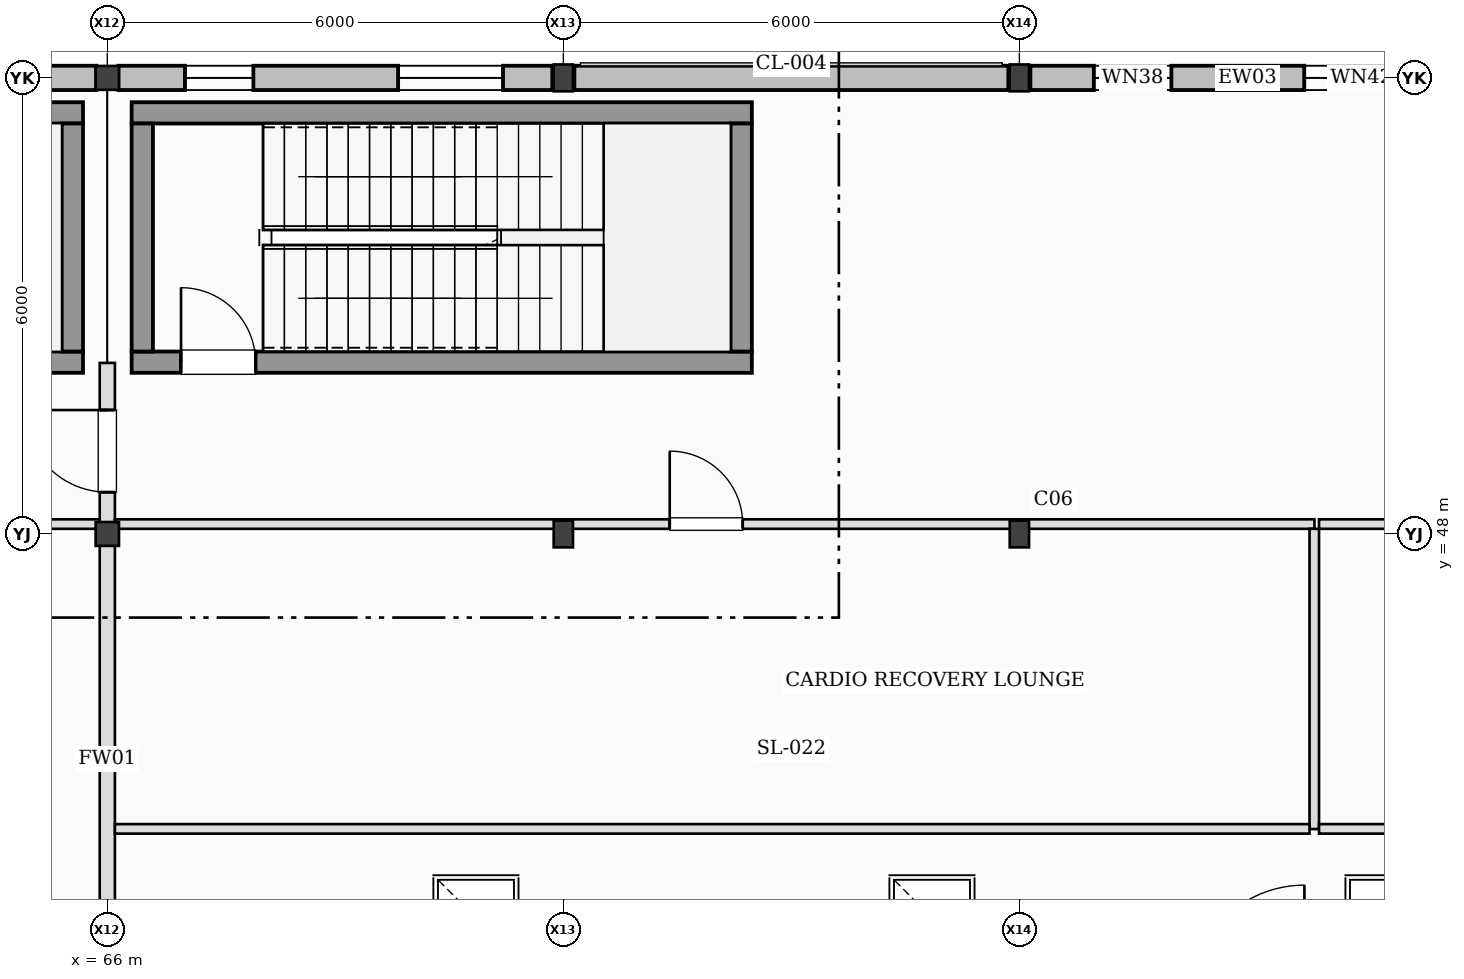
"""IFC4 building model, lengths in metres.
Left out: names, types, materials, properties, quantities, classifications, styles, units other than length and angle.
Written with IfcOpenShell. Run it as: python <this file> out.ifc"""

import sys

from ifc_helpers import new_model, si_unit, direction, frame, frame_2d, origin, origin_2d, place, context, subcontext, project, spatial, rectangle, i_section, extrude, element, fill, save


model = new_model("IFC4")
c1 = context("Model", 3, precision=1e-05, world=origin(), true_north=direction((0.0, 1.0)))
c2 = subcontext(c1, "Body", "Model", "MODEL_VIEW")
j1 = project(units=[si_unit("LENGTHUNIT", "METRE"), si_unit("PLANEANGLEUNIT", "RADIAN")], contexts=[c1])
p1 = place(None, origin())
s1 = spatial("IfcSite", under=j1, at=p1, CompositionType="ELEMENT")
p2 = place(p1, origin())
s2 = spatial("IfcBuilding", under=s1, at=p2, CompositionType="ELEMENT")
p3 = place(p2, frame((0.0, 0.0, 6.0)))
s3 = spatial("IfcBuildingStorey", under=s2, at=p3, CompositionType="ELEMENT", Elevation=6.0)
for number, where, z_axis, x_axis in (
    (1, (66.0, 48.0, 0.0), (0.0, 0.0, 1.0), (1.0, 0.0, 0.0)),
    (2, (66.0, 54.0, 0.0), (0.0, 0.0, 1.0), (1.0, 0.0, 0.0)),
):
    element("IfcColumn", number, at=place(p3, frame(where, z_axis=z_axis, x_axis=x_axis)), inside=s3, PredefinedType="COLUMN", context=c2, shape_type="SweptSolid", body=[
        extrude(i_section(OverallWidth=0.307, OverallDepth=0.314, WebThickness=0.011, FlangeThickness=0.019, at=origin_2d()), origin(), (0.0, 0.0, 1.0), 4.0),
    ])
for number, where, z_axis, x_axis in (
    (3, (72.0, 48.0, 0.0), (0.0, 0.0, 1.0), (1.0, 0.0, 0.0)),
    (4, (72.0, 54.0, 0.0), (0.0, 0.0, 1.0), (1.0, 0.0, 0.0)),
    (5, (78.0, 48.0, 0.0), (0.0, 0.0, 1.0), (1.0, 0.0, 0.0)),
    (6, (78.0, 54.0, 0.0), (0.0, 0.0, 1.0), (1.0, 0.0, 0.0)),
):
    element("IfcColumn", number, at=place(p3, frame(where, z_axis=z_axis, x_axis=x_axis)), inside=s3, PredefinedType="COLUMN", context=c2, shape_type="SweptSolid", body=[
        extrude(i_section(OverallWidth=0.254, OverallDepth=0.353, WebThickness=0.01, FlangeThickness=0.016, at=origin_2d()), origin(), (0.0, 0.0, 1.0), 4.0),
    ])
p4 = place(p3, frame((65.855, 54.0, 0.0), z_axis=(0.0, 0.0, 1.0), x_axis=(-1.0, 0.0, 0.0)))
e7 = element("IfcWall", 7, at=p4, inside=s3, PredefinedType="STANDARD", context=c2, shape_type="SweptSolid", body=[
    extrude(rectangle(XDim=5.71, YDim=0.32, at=frame_2d((2.855, 0.0))), origin(), (0.0, 0.0, 1.0), 4.0),
])
p5 = place(p4, frame((0.67, 0.0, 1.18)))
e8 = element("IfcOpeningElement", 8, at=p5, cuts=e7, PredefinedType="OPENING", context=c2, shape_type="SweptSolid", body=[
    extrude(rectangle(XDim=1.32, YDim=1.32, at=frame_2d((0.66, 0.66))), frame((0.0, 0.17, 0.0), z_axis=(0.0, -1.0, 0.0), x_axis=(1.0, 0.0, 0.0)), (0.0, 0.0, 1.0), 0.34),
])
p6 = place(p4, frame((3.504, 0.0, 0.96)))
e9 = element("IfcOpeningElement", 9, at=p6, cuts=e7, PredefinedType="OPENING", context=c2, shape_type="SweptSolid", body=[
    extrude(rectangle(XDim=1.56, YDim=1.56, at=frame_2d((0.78, 0.78))), frame((0.0, 0.17, 0.0), z_axis=(0.0, -1.0, 0.0), x_axis=(1.0, 0.0, 0.0)), (0.0, 0.0, 1.0), 0.34),
])
p7 = place(p3, frame((71.855, 54.0, 0.0), z_axis=(0.0, 0.0, 1.0), x_axis=(-1.0, 0.0, 0.0)))
e10 = element("IfcWall", 10, at=p7, inside=s3, PredefinedType="STANDARD", context=c2, shape_type="SweptSolid", body=[
    extrude(rectangle(XDim=5.71, YDim=0.32, at=frame_2d((2.855, 0.0))), origin(), (0.0, 0.0, 1.0), 3.153),
])
p8 = place(p7, frame((0.649, 0.0, 0.96)))
e11 = element("IfcOpeningElement", 11, at=p8, cuts=e10, PredefinedType="OPENING", context=c2, shape_type="SweptSolid", body=[
    extrude(rectangle(XDim=1.38, YDim=1.38, at=frame_2d((0.69, 0.69))), frame((0.0, 0.17, 0.0), z_axis=(0.0, -1.0, 0.0), x_axis=(1.0, 0.0, 0.0)), (0.0, 0.0, 1.0), 0.34),
])
p9 = place(p7, frame((3.933, 0.0, 0.86)))
e12 = element("IfcOpeningElement", 12, at=p9, cuts=e10, PredefinedType="OPENING", context=c2, shape_type="SweptSolid", body=[
    extrude(rectangle(XDim=0.9, YDim=0.9, at=frame_2d((0.45, 0.45))), frame((0.0, 0.17, 0.0), z_axis=(0.0, -1.0, 0.0), x_axis=(1.0, 0.0, 0.0)), (0.0, 0.0, 1.0), 0.34),
])
p10 = place(p3, frame((77.855, 54.0, 0.0), z_axis=(0.0, 0.0, 1.0), x_axis=(-1.0, 0.0, 0.0)))
e13 = element("IfcWall", 13, at=p10, inside=s3, PredefinedType="STANDARD", context=c2, shape_type="SweptSolid", body=[
    extrude(rectangle(XDim=5.71, YDim=0.32, at=frame_2d((2.855, 0.0))), origin(), (0.0, 0.0, 1.0), 3.153),
])
p11 = place(p3, frame((83.855, 54.0, 0.0), z_axis=(0.0, 0.0, 1.0), x_axis=(-1.0, 0.0, 0.0)))
e14 = element("IfcWall", 14, at=p11, inside=s3, PredefinedType="STANDARD", context=c2, shape_type="SweptSolid", body=[
    extrude(rectangle(XDim=5.71, YDim=0.32, at=frame_2d((2.855, 0.0))), origin(), (0.0, 0.0, 1.0), 3.153),
])
p12 = place(p11, frame((0.607, 0.0, 0.86)))
e15 = element("IfcOpeningElement", 15, at=p12, cuts=e14, PredefinedType="OPENING", context=c2, shape_type="SweptSolid", body=[
    extrude(rectangle(XDim=1.5, YDim=1.5, at=frame_2d((0.75, 0.75))), frame((0.0, 0.17, 0.0), z_axis=(0.0, -1.0, 0.0), x_axis=(1.0, 0.0, 0.0)), (0.0, 0.0, 1.0), 0.34),
])
p13 = place(p11, frame((3.855, 0.0, 1.42)))
e16 = element("IfcOpeningElement", 16, at=p13, cuts=e14, PredefinedType="OPENING", context=c2, shape_type="SweptSolid", body=[
    extrude(rectangle(XDim=1.02, YDim=1.02, at=frame_2d((0.51, 0.51))), frame((0.0, 0.17, 0.0), z_axis=(0.0, -1.0, 0.0), x_axis=(1.0, 0.0, 0.0)), (0.0, 0.0, 1.0), 0.34),
])
p14 = place(p3, frame((57.52, 50.26, 0.0), z_axis=(0.0, 0.0, 1.0), x_axis=(1.0, 0.0, 0.0)))
e17 = element("IfcWall", 17, at=p14, inside=s3, PredefinedType="SHEAR", context=c2, shape_type="SweptSolid", body=[
    extrude(rectangle(XDim=8.16, YDim=0.28, at=frame_2d((4.08, 0.0))), origin(), (0.0, 0.0, 1.0), 3.75),
])
p15 = place(p14, frame((0.65, 0.0, 0.0)))
e18 = element("IfcOpeningElement", 18, at=p15, cuts=e17, PredefinedType="OPENING", context=c2, shape_type="SweptSolid", body=[
    extrude(rectangle(XDim=0.98, YDim=2.15, at=frame_2d((0.49, 1.075))), frame((0.0, 0.15, 0.0), z_axis=(0.0, -1.0, 0.0), x_axis=(1.0, 0.0, 0.0)), (0.0, 0.0, 1.0), 0.3),
])
p16 = place(p3, frame((65.68, 53.54, 0.0), z_axis=(0.0, 0.0, 1.0), x_axis=(-1.0, 0.0, 0.0)))
e19 = element("IfcWall", 19, at=p16, inside=s3, PredefinedType="SHEAR", context=c2, shape_type="SweptSolid", body=[
    extrude(rectangle(XDim=8.16, YDim=0.28, at=frame_2d((4.08, 0.0))), origin(), (0.0, 0.0, 1.0), 3.75),
])
p17 = place(p3, frame((65.54, 50.4, 0.0), z_axis=(0.0, 0.0, 1.0), x_axis=(0.0, 1.0, 0.0)))
e20 = element("IfcWall", 20, at=p17, inside=s3, PredefinedType="SHEAR", context=c2, shape_type="SweptSolid", body=[
    extrude(rectangle(XDim=3.0, YDim=0.28, at=frame_2d((1.5, 0.0))), origin(), (0.0, 0.0, 1.0), 3.75),
])
p18 = place(p3, frame((66.32, 50.26, 0.0), z_axis=(0.0, 0.0, 1.0), x_axis=(1.0, 0.0, 0.0)))
e21 = element("IfcWall", 21, at=p18, inside=s3, PredefinedType="SHEAR", context=c2, shape_type="SweptSolid", body=[
    extrude(rectangle(XDim=8.16, YDim=0.28, at=frame_2d((4.08, 0.0))), origin(), (0.0, 0.0, 1.0), 4.0),
])
p19 = place(p18, frame((0.65, 0.0, 0.0)))
e22 = element("IfcOpeningElement", 22, at=p19, cuts=e21, PredefinedType="OPENING", context=c2, shape_type="SweptSolid", body=[
    extrude(rectangle(XDim=0.98, YDim=2.15, at=frame_2d((0.49, 1.075))), frame((0.0, 0.15, 0.0), z_axis=(0.0, -1.0, 0.0), x_axis=(1.0, 0.0, 0.0)), (0.0, 0.0, 1.0), 0.3),
])
p20 = place(p3, frame((74.48, 53.54, 0.0), z_axis=(0.0, 0.0, 1.0), x_axis=(-1.0, 0.0, 0.0)))
e23 = element("IfcWall", 23, at=p20, inside=s3, PredefinedType="SHEAR", context=c2, shape_type="SweptSolid", body=[
    extrude(rectangle(XDim=8.16, YDim=0.28, at=frame_2d((4.08, 0.0))), origin(), (0.0, 0.0, 1.0), 4.0),
])
for number, where, z_axis, x_axis in (
    (24, (66.46, 53.4, 0.0), (0.0, 0.0, 1.0), (0.0, -1.0, 0.0)),
    (25, (74.34, 50.4, 0.0), (0.0, 0.0, 1.0), (0.0, 1.0, 0.0)),
):
    element("IfcWall", number, at=place(p3, frame(where, z_axis=z_axis, x_axis=x_axis)), inside=s3, PredefinedType="SHEAR", context=c2, shape_type="SweptSolid", body=[
        extrude(rectangle(XDim=3.0, YDim=0.28, at=frame_2d((1.5, 0.0))), origin(), (0.0, 0.0, 1.0), 4.0),
    ])
p21 = place(p3, frame((66.0, 42.18, 0.0), z_axis=(0.0, 0.0, 1.0), x_axis=(0.0, 1.0, 0.0)))
e26 = element("IfcWall", 26, at=p21, inside=s3, PredefinedType="PARTITIONING", context=c2, shape_type="SweptSolid", body=[
    extrude(rectangle(XDim=5.72, YDim=0.2, at=frame_2d((2.86, 0.0))), origin(), (0.0, 0.0, 1.0), 3.65),
])
p22 = place(p3, frame((66.0, 48.05, 0.0), z_axis=(0.0, 0.0, 1.0), x_axis=(0.0, 1.0, 0.0)))
e27 = element("IfcWall", 27, at=p22, inside=s3, PredefinedType="PARTITIONING", context=c2, shape_type="SweptSolid", body=[
    extrude(rectangle(XDim=2.2, YDim=0.2, at=frame_2d((1.1, 0.0))), origin(), (0.0, 0.0, 1.0), 3.65),
])
p23 = place(p22, frame((0.5, 0.0, 0.0)))
e28 = element("IfcOpeningElement", 28, at=p23, cuts=e27, PredefinedType="OPENING", context=c2, shape_type="SweptSolid", body=[
    extrude(rectangle(XDim=1.08, YDim=2.14, at=frame_2d((0.54, 1.07))), frame((0.0, 0.11, 0.0), z_axis=(0.0, -1.0, 0.0), x_axis=(1.0, 0.0, 0.0)), (0.0, 0.0, 1.0), 0.22),
])
p24 = place(p3, frame((53.98, 48.13, 0.0), z_axis=(0.0, 0.0, 1.0), x_axis=(1.0, 0.0, 0.0)))
e29 = element("IfcWall", 29, at=p24, inside=s3, PredefinedType="PARTITIONING", context=c2, shape_type="SweptSolid", body=[
    extrude(rectangle(XDim=11.92, YDim=0.125, at=frame_2d((5.96, 0.0))), origin(), (0.0, 0.0, 1.0), 3.72),
])
p25 = place(p24, frame((3.936, 0.0, 0.0)))
e30 = element("IfcOpeningElement", 30, at=p25, cuts=e29, PredefinedType="OPENING", context=c2, shape_type="SweptSolid", body=[
    extrude(rectangle(XDim=1.16, YDim=2.2, at=frame_2d((0.58, 1.1))), frame((0.0, 0.073, 0.0), z_axis=(0.0, -1.0, 0.0), x_axis=(1.0, 0.0, 0.0)), (0.0, 0.0, 1.0), 0.145),
])
p26 = place(p3, frame((66.1, 48.13, 0.0), z_axis=(0.0, 0.0, 1.0), x_axis=(1.0, 0.0, 0.0)))
e31 = element("IfcWall", 31, at=p26, inside=s3, PredefinedType="PARTITIONING", context=c2, shape_type="SweptSolid", body=[
    extrude(rectangle(XDim=15.782, YDim=0.125, at=frame_2d((7.891, 0.0))), origin(), (0.0, 0.0, 1.0), 3.153),
])
p27 = place(p26, frame((7.3, 0.0, 0.0)))
e32 = element("IfcOpeningElement", 32, at=p27, cuts=e31, PredefinedType="OPENING", context=c2, shape_type="SweptSolid", body=[
    extrude(rectangle(XDim=0.96, YDim=2.15, at=frame_2d((0.48, 1.075))), frame((0.0, 0.073, 0.0), z_axis=(0.0, -1.0, 0.0), x_axis=(1.0, 0.0, 0.0)), (0.0, 0.0, 1.0), 0.145),
])
p28 = place(p3, frame((81.88, 48.067, 0.0), z_axis=(0.0, 0.0, 1.0), x_axis=(0.0, -1.0, 0.0)))
e33 = element("IfcWall", 33, at=p28, inside=s3, PredefinedType="PARTITIONING", context=c2, shape_type="SweptSolid", body=[
    extrude(rectangle(XDim=3.95, YDim=0.125, at=frame_2d((1.975, 0.0))), origin(), (0.0, 0.0, 1.0), 3.43),
])
p29 = place(p3, frame((81.817, 44.12, 0.0), z_axis=(0.0, 0.0, 1.0), x_axis=(-1.0, 0.0, 0.0)))
e34 = element("IfcWall", 34, at=p29, inside=s3, PredefinedType="PARTITIONING", context=c2, shape_type="SweptSolid", body=[
    extrude(rectangle(XDim=15.717, YDim=0.125, at=frame_2d((7.859, 0.0))), origin(), (0.0, 0.0, 1.0), 3.72),
])
p30 = place(p3, frame((81.942, 48.13, 0.0), z_axis=(0.0, 0.0, 1.0), x_axis=(1.0, 0.0, 0.0)))
e35 = element("IfcWall", 35, at=p30, inside=s3, PredefinedType="PARTITIONING", context=c2, shape_type="SweptSolid", body=[
    extrude(rectangle(XDim=14.22, YDim=0.125, at=frame_2d((7.11, 0.0))), origin(), (0.0, 0.0, 1.0), 3.153),
])
p31 = place(p30, frame((6.198, 0.0, 0.0)))
e36 = element("IfcOpeningElement", 36, at=p31, cuts=e35, PredefinedType="OPENING", context=c2, shape_type="SweptSolid", body=[
    extrude(rectangle(XDim=0.93, YDim=2.1, at=frame_2d((0.465, 1.05))), frame((0.0, 0.073, 0.0), z_axis=(0.0, -1.0, 0.0), x_axis=(1.0, 0.0, 0.0)), (0.0, 0.0, 1.0), 0.145),
])
p32 = place(p3, frame((96.097, 44.12, 0.0), z_axis=(0.0, 0.0, 1.0), x_axis=(-1.0, 0.0, 0.0)))
e37 = element("IfcWall", 37, at=p32, inside=s3, PredefinedType="PARTITIONING", context=c2, shape_type="SweptSolid", body=[
    extrude(rectangle(XDim=14.155, YDim=0.125, at=frame_2d((7.078, 0.0))), origin(), (0.0, 0.0, 1.0), 3.72),
])
p33 = place(p8, origin())
e38 = element("IfcWindow", 38, at=p33, inside=s3, PartitioningType="SINGLE_PANEL", PredefinedType="WINDOW", context=c2, shape_type="SweptSolid", body=[
    extrude(rectangle(XDim=1.38, YDim=1.38, at=frame_2d((0.69, 0.69))), frame((0.0, 0.03, 0.0), z_axis=(0.0, -1.0, 0.0), x_axis=(1.0, 0.0, 0.0)), (0.0, 0.0, 1.0), 0.06),
])
fill(e11, e38)
p34 = place(p9, origin())
e39 = element("IfcWindow", 39, at=p34, inside=s3, PartitioningType="SINGLE_PANEL", PredefinedType="WINDOW", context=c2, shape_type="SweptSolid", body=[
    extrude(rectangle(XDim=0.9, YDim=0.9, at=frame_2d((0.45, 0.45))), frame((0.0, 0.03, 0.0), z_axis=(0.0, -1.0, 0.0), x_axis=(1.0, 0.0, 0.0)), (0.0, 0.0, 1.0), 0.06),
])
fill(e12, e39)
p35 = place(p12, origin())
e40 = element("IfcWindow", 40, at=p35, inside=s3, PartitioningType="SINGLE_PANEL", PredefinedType="WINDOW", context=c2, shape_type="SweptSolid", body=[
    extrude(rectangle(XDim=1.5, YDim=1.5, at=frame_2d((0.75, 0.75))), frame((0.0, 0.03, 0.0), z_axis=(0.0, -1.0, 0.0), x_axis=(1.0, 0.0, 0.0)), (0.0, 0.0, 1.0), 0.06),
])
fill(e15, e40)
p36 = place(p13, origin())
e41 = element("IfcWindow", 41, at=p36, inside=s3, PartitioningType="SINGLE_PANEL", PredefinedType="WINDOW", context=c2, shape_type="SweptSolid", body=[
    extrude(rectangle(XDim=1.02, YDim=1.02, at=frame_2d((0.51, 0.51))), frame((0.0, 0.03, 0.0), z_axis=(0.0, -1.0, 0.0), x_axis=(1.0, 0.0, 0.0)), (0.0, 0.0, 1.0), 0.06),
])
fill(e16, e41)
p37 = place(p19, origin())
e42 = element("IfcDoor", 42, at=p37, inside=s3, OperationType="SINGLE_SWING_LEFT", PredefinedType="DOOR", context=c2, shape_type="SweptSolid", body=[
    extrude(rectangle(XDim=0.98, YDim=2.15, at=frame_2d((0.49, 1.075))), frame((0.0, 0.025, 0.0), z_axis=(0.0, -1.0, 0.0), x_axis=(1.0, 0.0, 0.0)), (0.0, 0.0, 1.0), 0.05),
])
fill(e22, e42)
p38 = place(p23, frame((1.08, 0.0, 0.0), z_axis=(0.0, 0.0, 1.0), x_axis=(-1.0, 0.0, 0.0)))
e43 = element("IfcDoor", 43, at=p38, inside=s3, OperationType="SINGLE_SWING_RIGHT", PredefinedType="DOOR", context=c2, shape_type="SweptSolid", body=[
    extrude(rectangle(XDim=1.08, YDim=2.14, at=frame_2d((0.54, 1.07))), frame((0.0, 0.025, 0.0), z_axis=(0.0, -1.0, 0.0), x_axis=(1.0, 0.0, 0.0)), (0.0, 0.0, 1.0), 0.05),
])
fill(e28, e43)
p39 = place(p27, frame((0.96, 0.0, 0.0), z_axis=(0.0, 0.0, 1.0), x_axis=(-1.0, 0.0, 0.0)))
e44 = element("IfcDoor", 44, at=p39, inside=s3, OperationType="SINGLE_SWING_LEFT", PredefinedType="DOOR", context=c2, shape_type="SweptSolid", body=[
    extrude(rectangle(XDim=0.96, YDim=2.15, at=frame_2d((0.48, 1.075))), frame((0.0, 0.025, 0.0), z_axis=(0.0, -1.0, 0.0), x_axis=(1.0, 0.0, 0.0)), (0.0, 0.0, 1.0), 0.05),
])
fill(e32, e44)
save(model, sys.argv[1])
